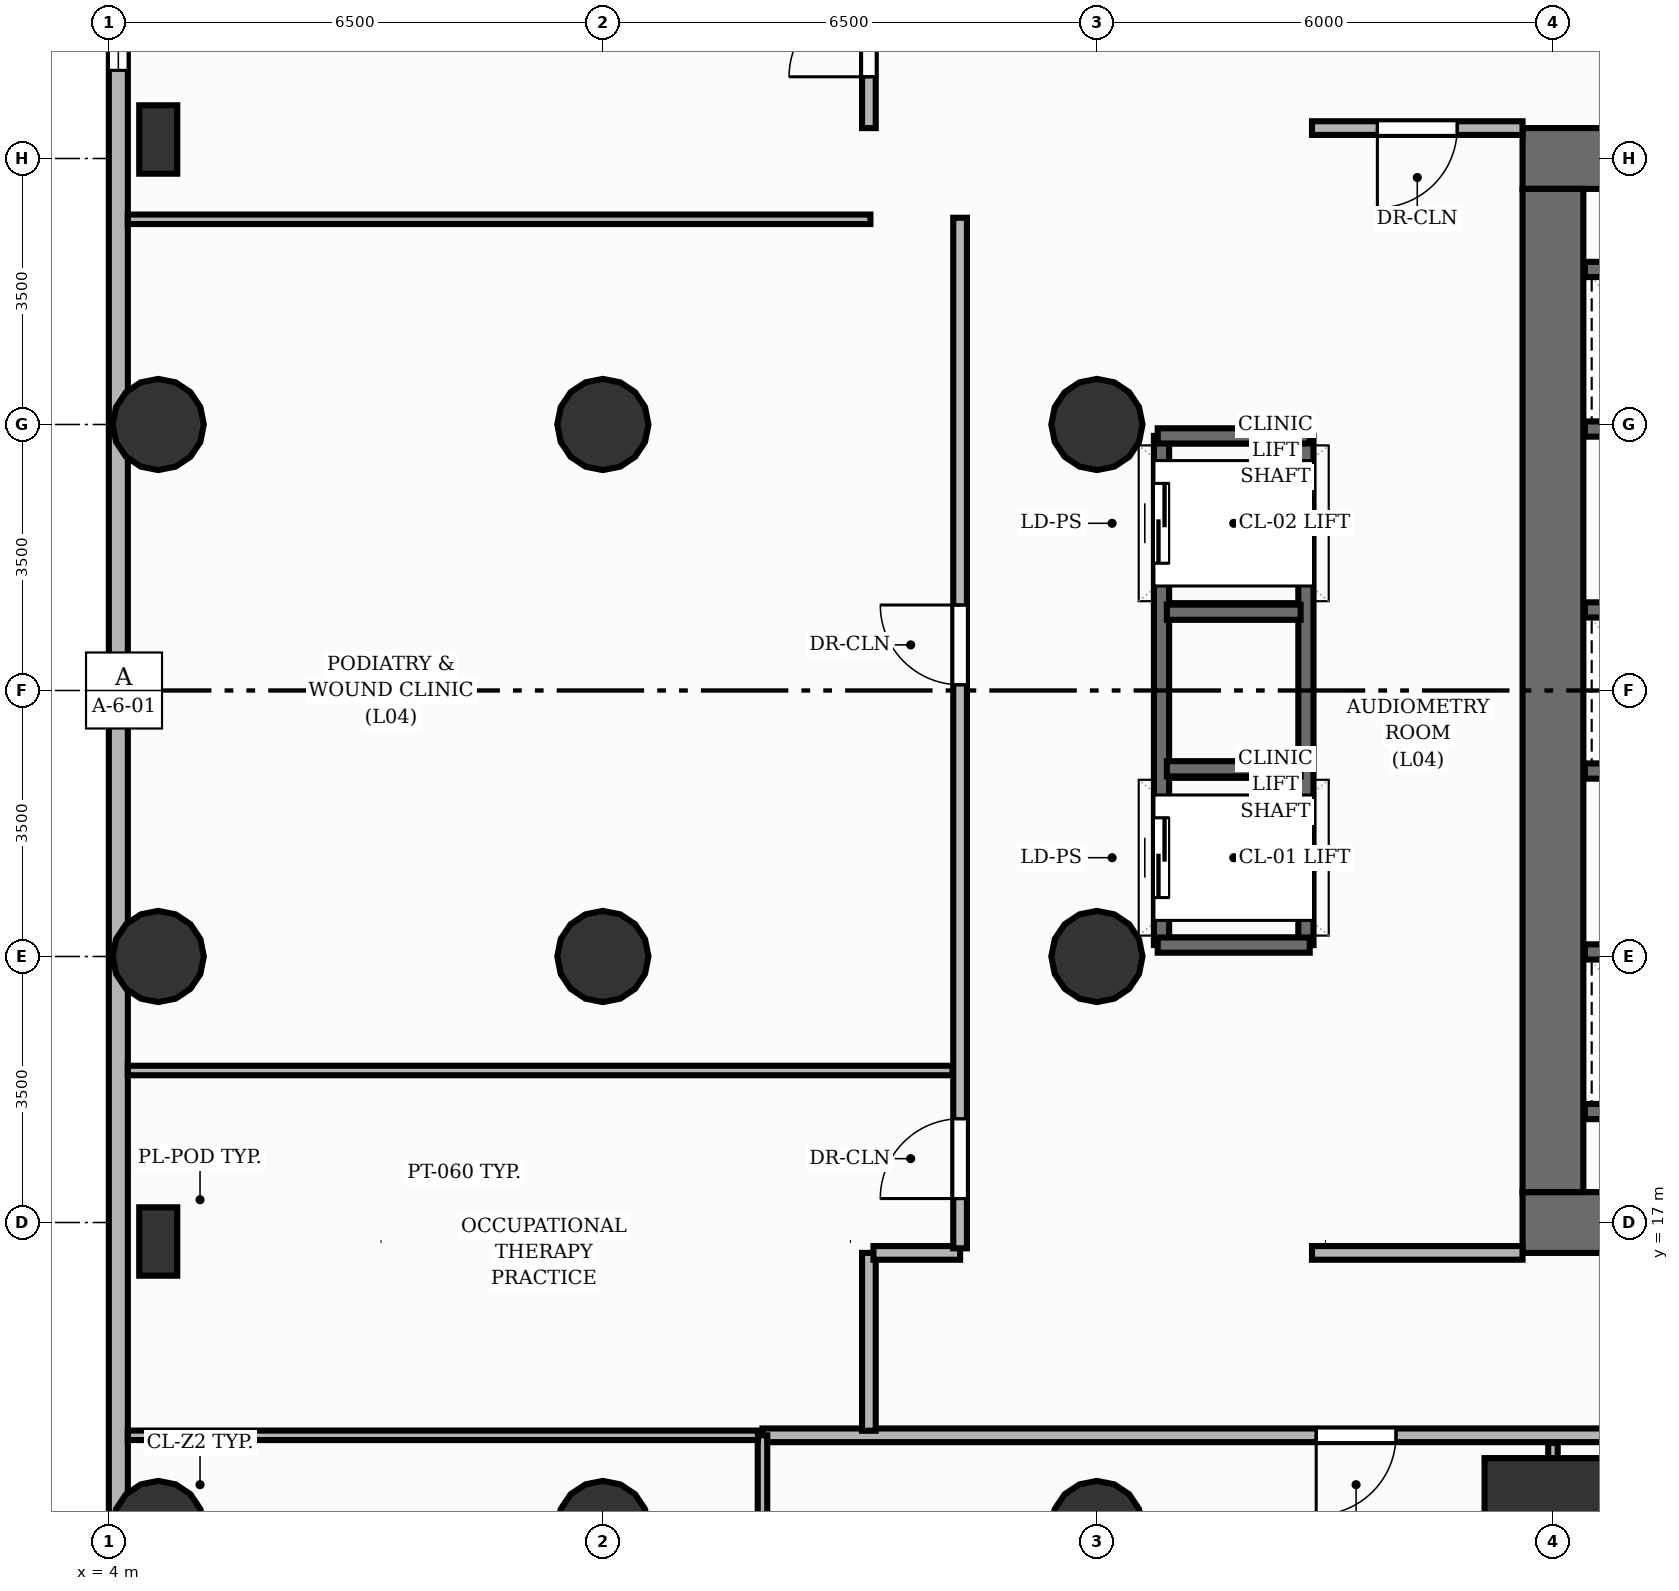
"""IFC4 building model, lengths in metres.
Left out: names, types, materials, properties, quantities, classifications, styles, units other than length and angle.
Written with IfcOpenShell. Run it as: python <this file> out.ifc"""

import sys

from ifc_helpers import new_model, si_unit, direction, frame, frame_2d, origin, origin_2d, place, context, subcontext, project, spatial, rectangle, circle, extrude, element, fill, save


model = new_model("IFC4")
c1 = context("Model", 3, precision=1e-05, world=origin(), true_north=direction((0.0, 1.0)))
c2 = subcontext(c1, "Body", "Model", "MODEL_VIEW")
j1 = project(units=[si_unit("LENGTHUNIT", "METRE"), si_unit("PLANEANGLEUNIT", "RADIAN")], contexts=[c1])
p1 = place(None, origin())
s1 = spatial("IfcSite", under=j1, at=p1, CompositionType="ELEMENT")
p2 = place(p1, origin())
s2 = spatial("IfcBuilding", under=s1, at=p2, CompositionType="ELEMENT")
p3 = place(p2, frame((0.0, 0.0, 16.0)))
s3 = spatial("IfcBuildingStorey", under=s2, at=p3, CompositionType="ELEMENT", Elevation=16.0)
p4 = place(p3, frame((22.6, 17.0, 0.0), z_axis=(0.0, 0.0, 1.0), x_axis=(1.0, 0.0, 0.0)))
e1 = element("IfcWall", 1, at=p4, inside=s3, PredefinedType="SHEAR", context=c2, shape_type="SweptSolid", body=[
    extrude(rectangle(XDim=18.8, YDim=0.8, at=frame_2d((9.4, 0.0))), origin(), (0.0, 0.0, 1.0), 4.0),
])
p5 = place(p4, frame((5.9, 0.0, 0.0)))
e2 = element("IfcOpeningElement", 2, at=p5, cuts=e1, PredefinedType="OPENING", context=c2, shape_type="SweptSolid", body=[
    extrude(rectangle(XDim=1.1, YDim=2.15, at=frame_2d((0.55, 1.075))), frame((0.0, 0.41, 0.0), z_axis=(0.0, -1.0, 0.0), x_axis=(1.0, 0.0, 0.0)), (0.0, 0.0, 1.0), 0.82),
])
p6 = place(p4, frame((9.45, 0.0, 0.0)))
e3 = element("IfcOpeningElement", 3, at=p6, cuts=e1, PredefinedType="OPENING", context=c2, shape_type="SweptSolid", body=[
    extrude(rectangle(XDim=0.9, YDim=2.1, at=frame_2d((0.45, 1.05))), frame((0.0, 0.41, 0.0), z_axis=(0.0, -1.0, 0.0), x_axis=(1.0, 0.0, 0.0)), (0.0, 0.0, 1.0), 0.82),
])
p7 = place(p3, frame((22.6, 31.0, 0.0), z_axis=(0.0, 0.0, 1.0), x_axis=(1.0, 0.0, 0.0)))
e4 = element("IfcWall", 4, at=p7, inside=s3, PredefinedType="SHEAR", context=c2, shape_type="SweptSolid", body=[
    extrude(rectangle(XDim=18.8, YDim=0.8, at=frame_2d((9.4, 0.0))), origin(), (0.0, 0.0, 1.0), 4.0),
])
p8 = place(p7, frame((11.8, 0.0, 0.0)))
e5 = element("IfcOpeningElement", 5, at=p8, cuts=e4, PredefinedType="OPENING", context=c2, shape_type="SweptSolid", body=[
    extrude(rectangle(XDim=1.1, YDim=2.15, at=frame_2d((0.55, 1.075))), frame((0.0, 0.41, 0.0), z_axis=(0.0, -1.0, 0.0), x_axis=(1.0, 0.0, 0.0)), (0.0, 0.0, 1.0), 0.82),
])
p9 = place(p3, frame((23.0, 17.4, 0.0), z_axis=(0.0, 0.0, 1.0), x_axis=(0.0, 1.0, 0.0)))
e6 = element("IfcWall", 6, at=p9, inside=s3, PredefinedType="SHEAR", context=c2, shape_type="SweptSolid", body=[
    extrude(rectangle(XDim=13.2, YDim=0.8, at=frame_2d((6.6, 0.0))), origin(), (0.0, 0.0, 1.0), 4.0),
])
for number, where, z_axis, x_axis in (
    (7, (4.65, 13.0, 0.0), (0.0, 0.0, 1.0), (1.0, 0.0, 0.0)),
    (8, (4.65, 20.5, 0.0), (0.0, 0.0, 1.0), (1.0, 0.0, 0.0)),
    (9, (4.65, 27.5, 0.0), (0.0, 0.0, 1.0), (1.0, 0.0, 0.0)),
    (10, (10.5, 13.0, 0.0), (0.0, 0.0, 1.0), (1.0, 0.0, 0.0)),
    (11, (10.5, 20.5, 0.0), (0.0, 0.0, 1.0), (1.0, 0.0, 0.0)),
    (12, (10.5, 27.5, 0.0), (0.0, 0.0, 1.0), (1.0, 0.0, 0.0)),
    (13, (17.0, 13.0, 0.0), (0.0, 0.0, 1.0), (1.0, 0.0, 0.0)),
    (14, (17.0, 20.5, 0.0), (0.0, 0.0, 1.0), (1.0, 0.0, 0.0)),
    (15, (17.0, 27.5, 0.0), (0.0, 0.0, 1.0), (1.0, 0.0, 0.0)),
):
    element("IfcColumn", number, at=place(p3, frame(where, z_axis=z_axis, x_axis=x_axis)), inside=s3, PredefinedType="COLUMN", context=c2, shape_type="SweptSolid", body=[
        extrude(circle(Radius=0.6, at=origin_2d()), origin(), (0.0, 0.0, 1.0), 4.0),
    ])
p10 = place(p3, frame((23.0, 13.0, 0.0), z_axis=(0.0, 0.0, 1.0), x_axis=(1.0, 0.0, 0.0)))
e16 = element("IfcColumn", 16, at=p10, inside=s3, PredefinedType="COLUMN", context=c2, shape_type="SweptSolid", body=[
    extrude(rectangle(XDim=1.8, YDim=1.8, at=origin_2d()), origin(), (0.0, 0.0, 1.0), 4.0),
])
for number, where, z_axis, x_axis in (
    (17, (4.65, 16.75, 0.0), (0.0, 0.0, 1.0), (1.0, 0.0, 0.0)),
    (18, (4.65, 31.25, 0.0), (0.0, 0.0, 1.0), (1.0, 0.0, 0.0)),
):
    element("IfcColumn", number, at=place(p3, frame(where, z_axis=z_axis, x_axis=x_axis)), inside=s3, PredefinedType="PILASTER", context=c2, shape_type="SweptSolid", body=[
        extrude(rectangle(XDim=0.5, YDim=0.9, at=origin_2d()), origin(), (0.0, 0.0, 1.0), 4.0),
    ])
p11 = place(p3, frame((4.125, 8.9, 0.0), z_axis=(0.0, 0.0, 1.0), x_axis=(0.0, 1.0, 0.0)))
e19 = element("IfcWall", 19, at=p11, inside=s3, PredefinedType="SOLIDWALL", context=c2, shape_type="SweptSolid", body=[
    extrude(rectangle(XDim=30.2, YDim=0.25, at=frame_2d((15.1, 0.0))), origin(), (0.0, 0.0, 1.0), 3.55),
])
p12 = place(p11, frame((23.26, 0.0, 0.9)))
e20 = element("IfcOpeningElement", 20, at=p12, cuts=e19, PredefinedType="OPENING", context=c2, shape_type="SweptSolid", body=[
    extrude(rectangle(XDim=1.8, YDim=1.8, at=frame_2d((0.9, 0.9))), frame((0.0, 0.135, 0.0), z_axis=(0.0, -1.0, 0.0), x_axis=(1.0, 0.0, 0.0)), (0.0, 0.0, 1.0), 0.27),
])
for number, where, z_axis, x_axis in (
    (21, (23.42, 18.46, 0.0), (0.0, 0.0, 1.0), (1.0, 0.0, 0.0)),
    (22, (23.42, 29.54, 0.0), (0.0, 0.0, 1.0), (1.0, 0.0, 0.0)),
    (23, (23.42, 20.56, 0.0), (0.0, 0.0, 1.0), (1.0, 0.0, 0.0)),
    (24, (23.42, 22.94, 0.0), (0.0, 0.0, 1.0), (1.0, 0.0, 0.0)),
    (25, (23.42, 25.06, 0.0), (0.0, 0.0, 1.0), (1.0, 0.0, 0.0)),
    (26, (23.42, 27.44, 0.0), (0.0, 0.0, 1.0), (1.0, 0.0, 0.0)),
):
    element("IfcWall", number, at=place(p3, frame(where, z_axis=z_axis, x_axis=x_axis)), inside=s3, PredefinedType="SHEAR", context=c2, shape_type="SweptSolid", body=[
        extrude(rectangle(XDim=1.71, YDim=0.2, at=frame_2d((0.855, 0.0))), origin(), (0.0, 0.0, 1.0), 4.0),
    ])
p13 = place(p3, frame((17.85, 20.65, 0.0), z_axis=(0.0, 0.0, 1.0), x_axis=(0.0, 1.0, 0.0)))
e27 = element("IfcWall", 27, at=p13, inside=s3, PredefinedType="SHEAR", context=c2, shape_type="SweptSolid", body=[
    extrude(rectangle(XDim=6.7, YDim=0.2, at=frame_2d((3.35, 0.0))), origin(), (0.0, 0.0, 1.0), 4.0),
])
p14 = place(p13, frame((0.625, 0.0, 0.0)))
e28 = element("IfcOpeningElement", 28, at=p14, cuts=e27, PredefinedType="OPENING", context=c2, shape_type="SweptSolid", body=[
    extrude(rectangle(XDim=1.05, YDim=2.15, at=frame_2d((0.525, 1.075))), frame((0.0, 0.11, 0.0), z_axis=(0.0, -1.0, 0.0), x_axis=(1.0, 0.0, 0.0)), (0.0, 0.0, 1.0), 0.22),
])
p15 = place(p13, frame((5.025, 0.0, 0.0)))
e29 = element("IfcOpeningElement", 29, at=p15, cuts=e27, PredefinedType="OPENING", context=c2, shape_type="SweptSolid", body=[
    extrude(rectangle(XDim=1.05, YDim=2.15, at=frame_2d((0.525, 1.075))), frame((0.0, 0.11, 0.0), z_axis=(0.0, -1.0, 0.0), x_axis=(1.0, 0.0, 0.0)), (0.0, 0.0, 1.0), 0.22),
])
p16 = place(p3, frame((19.75, 20.65, 0.0), z_axis=(0.0, 0.0, 1.0), x_axis=(0.0, 1.0, 0.0)))
e30 = element("IfcWall", 30, at=p16, inside=s3, PredefinedType="SHEAR", context=c2, shape_type="SweptSolid", body=[
    extrude(rectangle(XDim=6.7, YDim=0.2, at=frame_2d((3.35, 0.0))), origin(), (0.0, 0.0, 1.0), 4.0),
])
for number, where, z_axis, x_axis in (
    (31, (17.8, 20.65, 0.0), (0.0, 0.0, 1.0), (1.0, 0.0, 0.0)),
    (32, (17.8, 27.35, 0.0), (0.0, 0.0, 1.0), (1.0, 0.0, 0.0)),
):
    element("IfcWall", number, at=place(p3, frame(where, z_axis=z_axis, x_axis=x_axis)), inside=s3, PredefinedType="SHEAR", context=c2, shape_type="SweptSolid", body=[
        extrude(rectangle(XDim=2.0, YDim=0.2, at=frame_2d((1.0, 0.0))), origin(), (0.0, 0.0, 1.0), 4.0),
    ])
for number, where, z_axis, x_axis in (
    (33, (17.92, 22.97, 0.0), (0.0, 0.0, 1.0), (1.0, 0.0, 0.0)),
    (34, (17.92, 25.03, 0.0), (0.0, 0.0, 1.0), (1.0, 0.0, 0.0)),
):
    element("IfcWall", number, at=place(p3, frame(where, z_axis=z_axis, x_axis=x_axis)), inside=s3, PredefinedType="SHEAR", context=c2, shape_type="SweptSolid", body=[
        extrude(rectangle(XDim=1.76, YDim=0.2, at=frame_2d((0.88, 0.0))), origin(), (0.0, 0.0, 1.0), 4.0),
    ])
p17 = place(p3, frame((41.02, 14.2, 0.0), z_axis=(0.0, 0.0, 1.0), x_axis=(-1.0, 0.0, 0.0)))
e35 = element("IfcWall", 35, at=p17, inside=s3, PredefinedType="PARTITIONING", context=c2, shape_type="SweptSolid", body=[
    extrude(rectangle(XDim=28.42, YDim=0.18, at=frame_2d((14.21, 0.0))), origin(), (0.0, 0.0, 1.0), 3.545),
])
p18 = place(p17, frame((20.085, 0.0, 0.0)))
e36 = element("IfcOpeningElement", 36, at=p18, cuts=e35, PredefinedType="OPENING", context=c2, shape_type="SweptSolid", body=[
    extrude(rectangle(XDim=1.05, YDim=2.15, at=frame_2d((0.525, 1.075))), frame((0.0, 0.1, 0.0), z_axis=(0.0, -1.0, 0.0), x_axis=(1.0, 0.0, 0.0)), (0.0, 0.0, 1.0), 0.2),
])
p19 = place(p17, frame((12.095, 0.0, 0.0)))
e37 = element("IfcOpeningElement", 37, at=p19, cuts=e35, PredefinedType="OPENING", context=c2, shape_type="SweptSolid", body=[
    extrude(rectangle(XDim=1.05, YDim=2.15, at=frame_2d((0.525, 1.075))), frame((0.0, 0.1, 0.0), z_axis=(0.0, -1.0, 0.0), x_axis=(1.0, 0.0, 0.0)), (0.0, 0.0, 1.0), 0.2),
])
p20 = place(p17, frame((3.095, 0.0, 0.0)))
e38 = element("IfcOpeningElement", 38, at=p20, cuts=e35, PredefinedType="OPENING", context=c2, shape_type="SweptSolid", body=[
    extrude(rectangle(XDim=1.05, YDim=2.15, at=frame_2d((0.525, 1.075))), frame((0.0, 0.1, 0.0), z_axis=(0.0, -1.0, 0.0), x_axis=(1.0, 0.0, 0.0)), (0.0, 0.0, 1.0), 0.2),
])
p21 = place(p3, frame((14.0, 14.26, 0.0), z_axis=(0.0, 0.0, 1.0), x_axis=(0.0, 1.0, 0.0)))
e39 = element("IfcWall", 39, at=p21, inside=s3, PredefinedType="PARTITIONING", context=c2, shape_type="SweptSolid", body=[
    extrude(rectangle(XDim=2.34, YDim=0.18, at=frame_2d((1.17, 0.0))), origin(), (0.0, 0.0, 1.0), 3.545),
])
p22 = place(p3, frame((14.06, 16.6, 0.0), z_axis=(0.0, 0.0, 1.0), x_axis=(1.0, 0.0, 0.0)))
e40 = element("IfcWall", 40, at=p22, inside=s3, PredefinedType="PARTITIONING", context=c2, shape_type="SweptSolid", body=[
    extrude(rectangle(XDim=1.14, YDim=0.18, at=frame_2d((0.57, 0.0))), origin(), (0.0, 0.0, 1.0), 2.838),
])
p23 = place(p3, frame((15.2, 16.66, 0.0), z_axis=(0.0, 0.0, 1.0), x_axis=(0.0, 1.0, 0.0)))
e41 = element("IfcWall", 41, at=p23, inside=s3, PredefinedType="PARTITIONING", context=c2, shape_type="SweptSolid", body=[
    extrude(rectangle(XDim=13.56, YDim=0.18, at=frame_2d((6.78, 0.0))), origin(), (0.0, 0.0, 1.0), 3.545),
])
p24 = place(p23, frame((0.655, 0.0, 0.0)))
e42 = element("IfcOpeningElement", 42, at=p24, cuts=e41, PredefinedType="OPENING", context=c2, shape_type="SweptSolid", body=[
    extrude(rectangle(XDim=1.05, YDim=2.15, at=frame_2d((0.525, 1.075))), frame((0.0, 0.1, 0.0), z_axis=(0.0, -1.0, 0.0), x_axis=(1.0, 0.0, 0.0)), (0.0, 0.0, 1.0), 0.2),
])
p25 = place(p23, frame((7.415, 0.0, 0.0)))
e43 = element("IfcOpeningElement", 43, at=p25, cuts=e41, PredefinedType="OPENING", context=c2, shape_type="SweptSolid", body=[
    extrude(rectangle(XDim=1.05, YDim=2.15, at=frame_2d((0.525, 1.075))), frame((0.0, 0.1, 0.0), z_axis=(0.0, -1.0, 0.0), x_axis=(1.0, 0.0, 0.0)), (0.0, 0.0, 1.0), 0.2),
])
p26 = place(p3, frame((14.0, 31.4, 0.0), z_axis=(0.0, 0.0, 1.0), x_axis=(0.0, 1.0, 0.0)))
e44 = element("IfcWall", 44, at=p26, inside=s3, PredefinedType="PARTITIONING", context=c2, shape_type="SweptSolid", body=[
    extrude(rectangle(XDim=12.35, YDim=0.18, at=frame_2d((6.175, 0.0))), origin(), (0.0, 0.0, 1.0), 3.545),
])
p27 = place(p26, frame((0.675, 0.0, 0.0)))
e45 = element("IfcOpeningElement", 45, at=p27, cuts=e44, PredefinedType="OPENING", context=c2, shape_type="SweptSolid", body=[
    extrude(rectangle(XDim=1.05, YDim=2.15, at=frame_2d((0.525, 1.075))), frame((0.0, 0.1, 0.0), z_axis=(0.0, -1.0, 0.0), x_axis=(1.0, 0.0, 0.0)), (0.0, 0.0, 1.0), 0.2),
])
p28 = place(p26, frame((6.925, 0.0, 0.0)))
e46 = element("IfcOpeningElement", 46, at=p28, cuts=e44, PredefinedType="OPENING", context=c2, shape_type="SweptSolid", body=[
    extrude(rectangle(XDim=0.9, YDim=2.1, at=frame_2d((0.45, 1.05))), frame((0.0, 0.1, 0.0), z_axis=(0.0, -1.0, 0.0), x_axis=(1.0, 0.0, 0.0)), (0.0, 0.0, 1.0), 0.2),
])
p29 = place(p3, frame((22.6, 31.4, 0.0), z_axis=(0.0, 0.0, 1.0), x_axis=(-1.0, 0.0, 0.0)))
e47 = element("IfcWall", 47, at=p29, inside=s3, PredefinedType="PARTITIONING", context=c2, shape_type="SweptSolid", body=[
    extrude(rectangle(XDim=2.77, YDim=0.18, at=frame_2d((1.385, 0.0))), origin(), (0.0, 0.0, 1.0), 3.545),
])
p30 = place(p29, frame((0.86, 0.0, 0.0)))
e48 = element("IfcOpeningElement", 48, at=p30, cuts=e47, PredefinedType="OPENING", context=c2, shape_type="SweptSolid", body=[
    extrude(rectangle(XDim=1.05, YDim=2.15, at=frame_2d((0.525, 1.075))), frame((0.0, 0.1, 0.0), z_axis=(0.0, -1.0, 0.0), x_axis=(1.0, 0.0, 0.0)), (0.0, 0.0, 1.0), 0.2),
])
p31 = place(p3, frame((19.83, 16.6, 0.0), z_axis=(0.0, 0.0, 1.0), x_axis=(1.0, 0.0, 0.0)))
e49 = element("IfcWall", 49, at=p31, inside=s3, PredefinedType="PARTITIONING", context=c2, shape_type="SweptSolid", body=[
    extrude(rectangle(XDim=2.77, YDim=0.18, at=frame_2d((1.385, 0.0))), origin(), (0.0, 0.0, 1.0), 2.838),
])
p32 = place(p3, frame((12.6, 14.2, 0.0), z_axis=(0.0, 0.0, 1.0), x_axis=(0.0, -1.0, 0.0)))
e50 = element("IfcWall", 50, at=p32, inside=s3, PredefinedType="PARTITIONING", context=c2, shape_type="SweptSolid", body=[
    extrude(rectangle(XDim=9.95, YDim=0.125, at=frame_2d((4.975, 0.0))), origin(), (0.0, 0.0, 1.0), 3.545),
])
p33 = place(p32, frame((4.45, 0.0, 0.0)))
e51 = element("IfcOpeningElement", 51, at=p33, cuts=e50, PredefinedType="OPENING", context=c2, shape_type="SweptSolid", body=[
    extrude(rectangle(XDim=1.05, YDim=2.15, at=frame_2d((0.525, 1.075))), frame((0.0, 0.073, 0.0), z_axis=(0.0, -1.0, 0.0), x_axis=(1.0, 0.0, 0.0)), (0.0, 0.0, 1.0), 0.145),
])
p34 = place(p3, frame((4.25, 14.2, 0.0), z_axis=(0.0, 0.0, 1.0), x_axis=(1.0, 0.0, 0.0)))
e52 = element("IfcWall", 52, at=p34, inside=s3, PredefinedType="PARTITIONING", context=c2, shape_type="SweptSolid", body=[
    extrude(rectangle(XDim=8.29, YDim=0.125, at=frame_2d((4.145, 0.0))), origin(), (0.0, 0.0, 1.0), 3.545),
])
p35 = place(p3, frame((23.0, 14.1, 0.0), z_axis=(0.0, 0.0, 1.0), x_axis=(0.0, -1.0, 0.0)))
e53 = element("IfcWall", 53, at=p35, inside=s3, PredefinedType="PARTITIONING", context=c2, shape_type="SweptSolid", body=[
    extrude(rectangle(XDim=9.85, YDim=0.125, at=frame_2d((4.925, 0.0))), origin(), (0.0, 0.0, 1.0), 3.001),
])
p36 = place(p3, frame((4.25, 19.0, 0.0), z_axis=(0.0, 0.0, 1.0), x_axis=(1.0, 0.0, 0.0)))
e54 = element("IfcWall", 54, at=p36, inside=s3, PredefinedType="PARTITIONING", context=c2, shape_type="SweptSolid", body=[
    extrude(rectangle(XDim=10.85, YDim=0.125, at=frame_2d((5.425, 0.0))), origin(), (0.0, 0.0, 1.0), 3.545),
])
p37 = place(p3, frame((4.25, 30.2, 0.0), z_axis=(0.0, 0.0, 1.0), x_axis=(1.0, 0.0, 0.0)))
e55 = element("IfcWall", 55, at=p37, inside=s3, PredefinedType="PARTITIONING", context=c2, shape_type="SweptSolid", body=[
    extrude(rectangle(XDim=9.77, YDim=0.125, at=frame_2d((4.885, 0.0))), origin(), (0.0, 0.0, 1.0), 3.545),
])
p38 = place(p12, origin())
e56 = element("IfcWindow", 56, at=p38, inside=s3, PartitioningType="SINGLE_PANEL", PredefinedType="WINDOW", context=c2, shape_type="SweptSolid", body=[
    extrude(rectangle(XDim=1.8, YDim=1.8, at=frame_2d((0.9, 0.9))), frame((0.0, 0.03, 0.0), z_axis=(0.0, -1.0, 0.0), x_axis=(1.0, 0.0, 0.0)), (0.0, 0.0, 1.0), 0.06),
])
fill(e20, e56)
p39 = place(p14, origin())
e57 = element("IfcDoor", 57, at=p39, inside=s3, OperationType="DOUBLE_DOOR_SLIDING", PredefinedType="DOOR", context=c2, shape_type="SweptSolid", body=[
    extrude(rectangle(XDim=1.05, YDim=2.15, at=frame_2d((0.525, 1.075))), frame((0.0, 0.025, 0.0), z_axis=(0.0, -1.0, 0.0), x_axis=(1.0, 0.0, 0.0)), (0.0, 0.0, 1.0), 0.05),
])
fill(e28, e57)
p40 = place(p15, origin())
e58 = element("IfcDoor", 58, at=p40, inside=s3, OperationType="DOUBLE_DOOR_SLIDING", PredefinedType="DOOR", context=c2, shape_type="SweptSolid", body=[
    extrude(rectangle(XDim=1.05, YDim=2.15, at=frame_2d((0.525, 1.075))), frame((0.0, 0.025, 0.0), z_axis=(0.0, -1.0, 0.0), x_axis=(1.0, 0.0, 0.0)), (0.0, 0.0, 1.0), 0.05),
])
fill(e29, e58)
p41 = place(p18, origin())
e59 = element("IfcDoor", 59, at=p41, inside=s3, OperationType="SINGLE_SWING_RIGHT", PredefinedType="DOOR", context=c2, shape_type="SweptSolid", body=[
    extrude(rectangle(XDim=1.05, YDim=2.15, at=frame_2d((0.525, 1.075))), frame((0.0, 0.025, 0.0), z_axis=(0.0, -1.0, 0.0), x_axis=(1.0, 0.0, 0.0)), (0.0, 0.0, 1.0), 0.05),
])
fill(e36, e59)
p42 = place(p24, origin())
e60 = element("IfcDoor", 60, at=p42, inside=s3, OperationType="SINGLE_SWING_LEFT", PredefinedType="DOOR", context=c2, shape_type="SweptSolid", body=[
    extrude(rectangle(XDim=1.05, YDim=2.15, at=frame_2d((0.525, 1.075))), frame((0.0, 0.025, 0.0), z_axis=(0.0, -1.0, 0.0), x_axis=(1.0, 0.0, 0.0)), (0.0, 0.0, 1.0), 0.05),
])
fill(e42, e60)
p43 = place(p25, origin())
e61 = element("IfcDoor", 61, at=p43, inside=s3, OperationType="SINGLE_SWING_RIGHT", PredefinedType="DOOR", context=c2, shape_type="SweptSolid", body=[
    extrude(rectangle(XDim=1.05, YDim=2.15, at=frame_2d((0.525, 1.075))), frame((0.0, 0.025, 0.0), z_axis=(0.0, -1.0, 0.0), x_axis=(1.0, 0.0, 0.0)), (0.0, 0.0, 1.0), 0.05),
])
fill(e43, e61)
p44 = place(p27, origin())
e62 = element("IfcDoor", 62, at=p44, inside=s3, OperationType="SINGLE_SWING_LEFT", PredefinedType="DOOR", context=c2, shape_type="SweptSolid", body=[
    extrude(rectangle(XDim=1.05, YDim=2.15, at=frame_2d((0.525, 1.075))), frame((0.0, 0.025, 0.0), z_axis=(0.0, -1.0, 0.0), x_axis=(1.0, 0.0, 0.0)), (0.0, 0.0, 1.0), 0.05),
])
fill(e45, e62)
p45 = place(p30, origin())
e63 = element("IfcDoor", 63, at=p45, inside=s3, OperationType="SINGLE_SWING_RIGHT", PredefinedType="DOOR", context=c2, shape_type="SweptSolid", body=[
    extrude(rectangle(XDim=1.05, YDim=2.15, at=frame_2d((0.525, 1.075))), frame((0.0, 0.025, 0.0), z_axis=(0.0, -1.0, 0.0), x_axis=(1.0, 0.0, 0.0)), (0.0, 0.0, 1.0), 0.05),
])
fill(e48, e63)
save(model, sys.argv[1])
